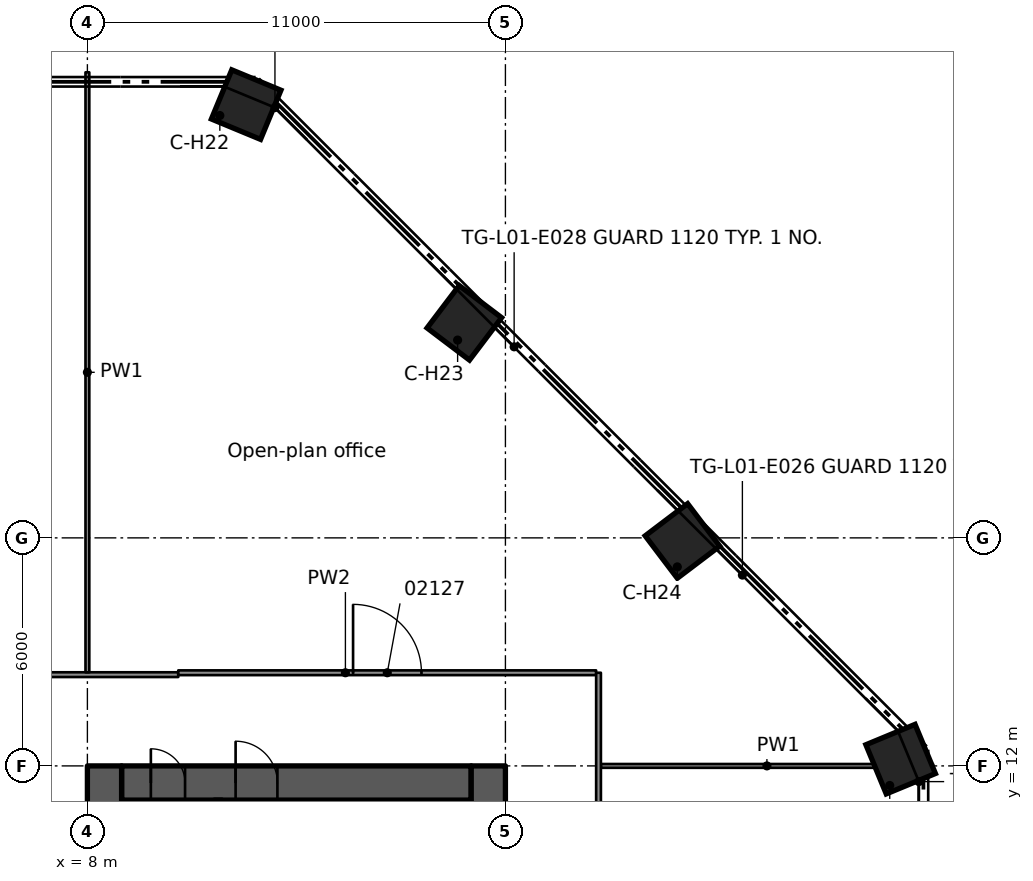
"""IFC4 building model, lengths in metres.
Left out: names, types, materials, properties, quantities, classifications, styles, units other than length and angle.
Written with IfcOpenShell. Run it as: python <this file> out.ifc"""

import sys

from ifc_helpers import new_model, si_unit, direction, frame, frame_2d, origin, origin_2d, place, context, subcontext, project, spatial, rectangle, extrude, element, fill, save


model = new_model("IFC4")
c1 = context("Model", 3, precision=1e-05, world=origin(), true_north=direction((0.0, 1.0)))
c2 = subcontext(c1, "Body", "Model", "MODEL_VIEW")
j1 = project(units=[si_unit("LENGTHUNIT", "METRE"), si_unit("PLANEANGLEUNIT", "RADIAN")], contexts=[c1])
p1 = place(None, origin())
s1 = spatial("IfcSite", under=j1, at=p1, CompositionType="ELEMENT")
p2 = place(p1, origin())
s2 = spatial("IfcBuilding", under=s1, at=p2, CompositionType="ELEMENT")
p3 = place(p2, frame((0.0, 0.0, 10.5)))
s3 = spatial("IfcBuildingStorey", under=s2, at=p3, CompositionType="ELEMENT", Elevation=10.5)
p4 = place(p3, frame((8.9, 11.55, 0.0), z_axis=(0.0, 0.0, 1.0), x_axis=(1.0, 0.0, 0.0)))
e1 = element("IfcWall", 1, at=p4, inside=s3, PredefinedType="SHEAR", context=c2, shape_type="SweptSolid", body=[
    extrude(rectangle(XDim=9.2, YDim=0.9, at=frame_2d((4.6, 0.0))), origin(), (0.0, 0.0, 1.0), 5.0),
])
p5 = place(p4, frame((3.0, 0.0, 0.0)))
e2 = element("IfcOpeningElement", 2, at=p5, cuts=e1, PredefinedType="OPENING", context=c2, shape_type="SweptSolid", body=[
    extrude(rectangle(XDim=1.1, YDim=2.1, at=frame_2d((0.55, 1.05))), frame((0.0, 0.46, 0.0), z_axis=(0.0, -1.0, 0.0), x_axis=(1.0, 0.0, 0.0)), (0.0, 0.0, 1.0), 0.92),
])
p6 = place(p4, frame((0.77, 0.0, 0.0)))
e3 = element("IfcOpeningElement", 3, at=p6, cuts=e1, PredefinedType="OPENING", context=c2, shape_type="SweptSolid", body=[
    extrude(rectangle(XDim=0.9, YDim=2.1, at=frame_2d((0.45, 1.05))), frame((0.0, 0.46, 0.0), z_axis=(0.0, -1.0, 0.0), x_axis=(1.0, 0.0, 0.0)), (0.0, 0.0, 1.0), 0.92),
])
p7 = place(p3, frame((8.45, -12.0, 0.0), z_axis=(0.0, 0.0, 1.0), x_axis=(0.0, 1.0, 0.0)))
e4 = element("IfcWall", 4, at=p7, inside=s3, PredefinedType="SHEAR", context=c2, shape_type="SweptSolid", body=[
    extrude(rectangle(XDim=24.0, YDim=0.9, at=frame_2d((12.0, 0.0))), origin(), (0.0, 0.0, 1.0), 5.0),
])
p8 = place(p7, frame((12.6, 0.0, 0.0)))
e5 = element("IfcOpeningElement", 5, at=p8, cuts=e4, PredefinedType="OPENING", context=c2, shape_type="SweptSolid", body=[
    extrude(rectangle(XDim=1.8, YDim=2.1, at=frame_2d((0.9, 1.05))), frame((0.0, 0.46, 0.0), z_axis=(0.0, -1.0, 0.0), x_axis=(1.0, 0.0, 0.0)), (0.0, 0.0, 1.0), 0.92),
])
p9 = place(p7, frame((3.25, 0.0, 0.0)))
e6 = element("IfcOpeningElement", 6, at=p9, cuts=e4, PredefinedType="OPENING", context=c2, shape_type="SweptSolid", body=[
    extrude(rectangle(XDim=1.1, YDim=2.1, at=frame_2d((0.55, 1.05))), frame((0.0, 0.46, 0.0), z_axis=(0.0, -1.0, 0.0), x_axis=(1.0, 0.0, 0.0)), (0.0, 0.0, 1.0), 0.92),
])
p10 = place(p3, frame((18.55, -12.0, 0.0), z_axis=(0.0, 0.0, 1.0), x_axis=(0.0, 1.0, 0.0)))
e7 = element("IfcWall", 7, at=p10, inside=s3, PredefinedType="SHEAR", context=c2, shape_type="SweptSolid", body=[
    extrude(rectangle(XDim=24.0, YDim=0.9, at=frame_2d((12.0, 0.0))), origin(), (0.0, 0.0, 1.0), 5.0),
])
p11 = place(p10, frame((12.1, 0.0, 0.0)))
e8 = element("IfcOpeningElement", 8, at=p11, cuts=e7, PredefinedType="OPENING", context=c2, shape_type="SweptSolid", body=[
    extrude(rectangle(XDim=1.8, YDim=2.1, at=frame_2d((0.9, 1.05))), frame((0.0, 0.46, 0.0), z_axis=(0.0, -1.0, 0.0), x_axis=(1.0, 0.0, 0.0)), (0.0, 0.0, 1.0), 0.92),
])
for number, where, z_axis, x_axis in (
    (9, (29.4, 12.178, -1.0), (0.0, 0.0, 1.0), (0.707, 0.707, 0.0)),
    (10, (12.178, 29.4, -1.0), (0.0, 0.0, 1.0), (0.707, 0.707, 0.0)),
    (11, (17.919, 23.659, -1.0), (0.0, 0.0, 1.0), (0.707, 0.707, 0.0)),
    (12, (23.659, 17.919, -1.0), (0.0, 0.0, 1.0), (0.707, 0.707, 0.0)),
):
    element("IfcColumn", number, at=place(p3, frame(where, z_axis=z_axis, x_axis=x_axis)), inside=s3, PredefinedType="COLUMN", context=c2, shape_type="SweptSolid", body=[
        extrude(rectangle(XDim=3.4, YDim=3.4, at=origin_2d()), origin(), (0.0, 0.0, 1.0), 1.0),
    ])
for number, where, z_axis, x_axis in (
    (13, (29.4, 12.178, 0.0), (0.0, 0.0, 1.0), (0.924, 0.383, 0.0)),
    (14, (12.178, 29.4, 0.0), (0.0, 0.0, 1.0), (0.383, 0.924, 0.0)),
    (15, (17.919, 23.659, 0.0), (0.0, 0.0, 1.0), (0.604, 0.797, 0.0)),
    (16, (23.659, 17.919, 0.0), (0.0, 0.0, 1.0), (0.797, 0.604, 0.0)),
):
    element("IfcColumn", number, at=place(p3, frame(where, z_axis=z_axis, x_axis=x_axis)), inside=s3, PredefinedType="COLUMN", context=c2, shape_type="SweptSolid", body=[
        extrude(rectangle(XDim=1.4, YDim=1.4, at=origin_2d()), origin(), (0.0, 0.0, 1.0), 5.0),
    ])
p12 = place(p3, frame((11.44, 11.1, 0.0), z_axis=(0.0, 0.0, 1.0), x_axis=(0.0, -1.0, 0.0)))
e17 = element("IfcWall", 17, at=p12, inside=s3, PredefinedType="SOLIDWALL", context=c2, shape_type="SweptSolid", body=[
    extrude(rectangle(XDim=4.125, YDim=0.2, at=frame_2d((2.062, 0.0))), origin(), (0.0, 0.0, 1.0), 4.59),
])
p13 = place(p3, frame((21.512, 12.0, 0.0), z_axis=(0.0, 0.0, 1.0), x_axis=(1.0, 0.0, 0.0)))
e18 = element("IfcWall", 18, at=p13, inside=s3, PredefinedType="PARTITIONING", context=c2, shape_type="SweptSolid", body=[
    extrude(rectangle(XDim=8.738, YDim=0.1, at=frame_2d((4.369, 0.0))), origin(), (0.0, 0.0, 1.0), 4.58),
])
p14 = place(p3, frame((-10.39, 14.401, 0.0), z_axis=(0.0, 0.0, 1.0), x_axis=(1.0, 0.0, 0.0)))
e19 = element("IfcWall", 19, at=p14, inside=s3, PredefinedType="PARTITIONING", context=c2, shape_type="SweptSolid", body=[
    extrude(rectangle(XDim=20.781, YDim=0.125, at=frame_2d((10.391, 0.0))), origin(), (0.0, 0.0, 1.0), 4.58),
])
p15 = place(p14, frame((13.49, 0.0, 0.0)))
e20 = element("IfcOpeningElement", 20, at=p15, cuts=e19, PredefinedType="OPENING", context=c2, shape_type="SweptSolid", body=[
    extrude(rectangle(XDim=1.8, YDim=2.1, at=frame_2d((0.9, 1.05))), frame((0.0, 0.073, 0.0), z_axis=(0.0, -1.0, 0.0), x_axis=(1.0, 0.0, 0.0)), (0.0, 0.0, 1.0), 0.145),
])
p16 = place(p14, frame((5.49, 0.0, 0.0)))
e21 = element("IfcOpeningElement", 21, at=p16, cuts=e19, PredefinedType="OPENING", context=c2, shape_type="SweptSolid", body=[
    extrude(rectangle(XDim=1.8, YDim=2.1, at=frame_2d((0.9, 1.05))), frame((0.0, 0.073, 0.0), z_axis=(0.0, -1.0, 0.0), x_axis=(1.0, 0.0, 0.0)), (0.0, 0.0, 1.0), 0.145),
])
p17 = place(p3, frame((10.391, 14.451, 0.0), z_axis=(0.0, 0.0, 1.0), x_axis=(1.0, 0.0, 0.0)))
e22 = element("IfcWall", 22, at=p17, inside=s3, PredefinedType="PARTITIONING", context=c2, shape_type="SweptSolid", body=[
    extrude(rectangle(XDim=10.996, YDim=0.125, at=frame_2d((5.498, 0.0))), origin(), (0.0, 0.0, 1.0), 4.58),
])
p18 = place(p17, frame((4.6, 0.0, 0.0)))
e23 = element("IfcOpeningElement", 23, at=p18, cuts=e22, PredefinedType="OPENING", context=c2, shape_type="SweptSolid", body=[
    extrude(rectangle(XDim=1.8, YDim=2.1, at=frame_2d((0.9, 1.05))), frame((0.0, 0.073, 0.0), z_axis=(0.0, -1.0, 0.0), x_axis=(1.0, 0.0, 0.0)), (0.0, 0.0, 1.0), 0.145),
])
p19 = place(p3, frame((21.45, 14.451, 0.0), z_axis=(0.0, 0.0, 1.0), x_axis=(0.0, -1.0, 0.0)))
e24 = element("IfcWall", 24, at=p19, inside=s3, PredefinedType="PARTITIONING", context=c2, shape_type="SweptSolid", body=[
    extrude(rectangle(XDim=26.451, YDim=0.125, at=frame_2d((13.226, 0.0))), origin(), (0.0, 0.0, 1.0), 4.58),
])
p20 = place(p19, frame((20.051, 0.0, 0.0)))
e25 = element("IfcOpeningElement", 25, at=p20, cuts=e24, PredefinedType="OPENING", context=c2, shape_type="SweptSolid", body=[
    extrude(rectangle(XDim=0.9, YDim=2.1, at=frame_2d((0.45, 1.05))), frame((0.0, 0.073, 0.0), z_axis=(0.0, -1.0, 0.0), x_axis=(1.0, 0.0, 0.0)), (0.0, 0.0, 1.0), 0.145),
])
p21 = place(p19, frame((7.801, 0.0, 0.0)))
e26 = element("IfcOpeningElement", 26, at=p21, cuts=e24, PredefinedType="OPENING", context=c2, shape_type="SweptSolid", body=[
    extrude(rectangle(XDim=1.1, YDim=2.1, at=frame_2d((0.55, 1.05))), frame((0.0, 0.073, 0.0), z_axis=(0.0, -1.0, 0.0), x_axis=(1.0, 0.0, 0.0)), (0.0, 0.0, 1.0), 0.145),
])
p22 = place(p3, frame((8.0, 14.463, 0.0), z_axis=(0.0, 0.0, 1.0), x_axis=(0.0, 1.0, 0.0)))
e27 = element("IfcWall", 27, at=p22, inside=s3, PredefinedType="PARTITIONING", context=c2, shape_type="SweptSolid", body=[
    extrude(rectangle(XDim=15.787, YDim=0.1, at=frame_2d((7.894, 0.0))), origin(), (0.0, 0.0, 1.0), 4.58),
])
p23 = place(p5, origin())
e28 = element("IfcDoor", 28, at=p23, inside=s3, OperationType="SINGLE_SWING_LEFT", PredefinedType="DOOR", context=c2, shape_type="SweptSolid", body=[
    extrude(rectangle(XDim=1.1, YDim=2.1, at=frame_2d((0.55, 1.05))), frame((0.0, 0.025, 0.0), z_axis=(0.0, -1.0, 0.0), x_axis=(1.0, 0.0, 0.0)), (0.0, 0.0, 1.0), 0.05),
])
fill(e2, e28)
p24 = place(p6, origin())
e29 = element("IfcDoor", 29, at=p24, inside=s3, OperationType="SINGLE_SWING_LEFT", PredefinedType="DOOR", context=c2, shape_type="SweptSolid", body=[
    extrude(rectangle(XDim=0.9, YDim=2.1, at=frame_2d((0.45, 1.05))), frame((0.0, 0.025, 0.0), z_axis=(0.0, -1.0, 0.0), x_axis=(1.0, 0.0, 0.0)), (0.0, 0.0, 1.0), 0.05),
])
fill(e3, e29)
p25 = place(p18, origin())
e30 = element("IfcDoor", 30, at=p25, inside=s3, OperationType="DOUBLE_DOOR_SINGLE_SWING", PredefinedType="DOOR", context=c2, shape_type="SweptSolid", body=[
    extrude(rectangle(XDim=1.8, YDim=2.1, at=frame_2d((0.9, 1.05))), frame((0.0, 0.025, 0.0), z_axis=(0.0, -1.0, 0.0), x_axis=(1.0, 0.0, 0.0)), (0.0, 0.0, 1.0), 0.05),
])
fill(e23, e30)
save(model, sys.argv[1])
